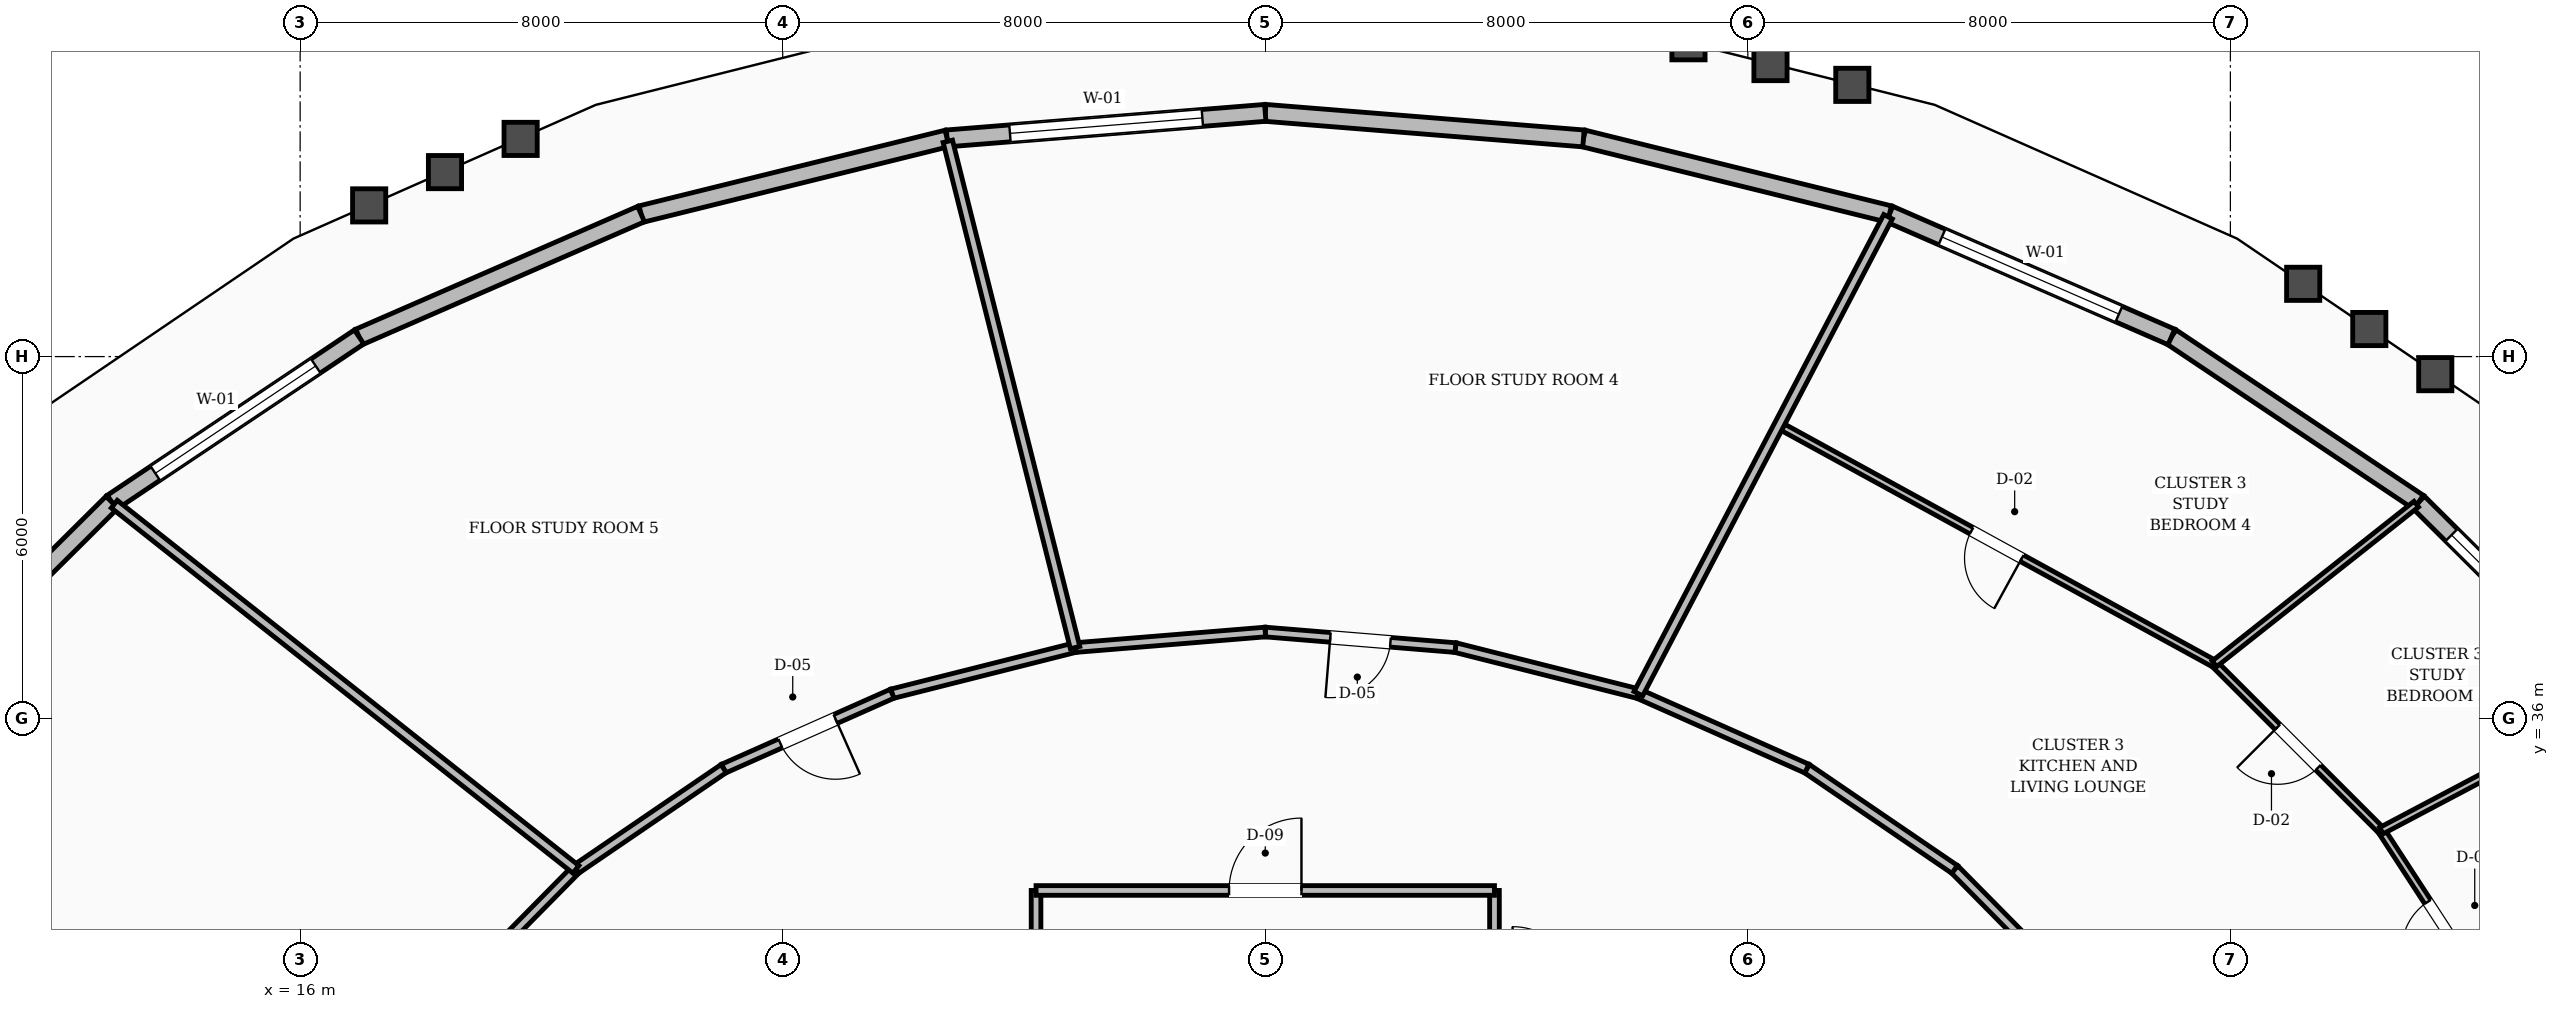
"""IFC4 building model, lengths in metres.
Left out: names, types, materials, properties, quantities, classifications, styles, units other than length and angle.
Written with IfcOpenShell. Run it as: python <this file> out.ifc"""

import sys

from ifc_helpers import new_model, si_unit, direction, frame, frame_2d, origin, place, context, subcontext, project, spatial, rectangle, extrude, element, fill, save


model = new_model("IFC4")
c1 = context("Model", 3, precision=1e-05, world=origin(), true_north=direction((0.0, 1.0)))
c2 = subcontext(c1, "Body", "Model", "MODEL_VIEW")
j1 = project(units=[si_unit("LENGTHUNIT", "METRE"), si_unit("PLANEANGLEUNIT", "RADIAN")], contexts=[c1])
p1 = place(None, origin())
s1 = spatial("IfcSite", under=j1, at=p1, CompositionType="ELEMENT")
p2 = place(p1, origin())
s2 = spatial("IfcBuilding", under=s1, at=p2, CompositionType="ELEMENT")
p3 = place(p2, frame((0.0, 0.0, 80.8)))
s3 = spatial("IfcBuildingStorey", under=s2, at=p3, CompositionType="ELEMENT", Elevation=80.8)
p4 = place(p3, frame((54.483, 36.245, 0.0), z_axis=(0.0, 0.0, 1.0), x_axis=(-0.709523691603, 0.704681581322, 0.0)))
e1 = element("IfcWall", 1, at=p4, inside=s3, PredefinedType="STANDARD", context=c2, shape_type="SweptSolid", body=[
    extrude(rectangle(XDim=4.74, YDim=0.28, at=frame_2d((2.37, 0.0))), origin(), (0.0, 0.0, 1.0), 2.71),
])
p5 = place(p4, frame((0.77, 0.0, 0.8)))
e2 = element("IfcOpeningElement", 2, at=p5, cuts=e1, PredefinedType="OPENING", context=c2, shape_type="SweptSolid", body=[
    extrude(rectangle(XDim=3.2, YDim=1.65, at=frame_2d((1.6, 0.825))), frame((0.0, 0.15, 0.0), z_axis=(0.0, -1.0, 0.0), x_axis=(1.0, 0.0, 0.0)), (0.0, 0.0, 1.0), 0.3),
])
p6 = place(p3, frame((51.12, 39.585, 0.0), z_axis=(0.0, 0.0, 1.0), x_axis=(-0.831173050052, 0.556013813558, 0.0)))
e3 = element("IfcWall", 3, at=p6, inside=s3, PredefinedType="STANDARD", context=c2, shape_type="SweptSolid", body=[
    extrude(rectangle(XDim=4.93, YDim=0.28, at=frame_2d((2.465, 0.0))), origin(), (0.0, 0.0, 1.0), 2.71),
])
p7 = place(p3, frame((47.023, 42.326, 0.0), z_axis=(0.0, 0.0, 1.0), x_axis=(-0.91677599057, 0.399401781561, 0.0)))
e4 = element("IfcWall", 4, at=p7, inside=s3, PredefinedType="STANDARD", context=c2, shape_type="SweptSolid", body=[
    extrude(rectangle(XDim=5.099, YDim=0.28, at=frame_2d((2.55, 0.0))), origin(), (0.0, 0.0, 1.0), 2.71),
])
p8 = place(p7, frame((0.95, 0.0, 0.8)))
e5 = element("IfcOpeningElement", 5, at=p8, cuts=e4, PredefinedType="OPENING", context=c2, shape_type="SweptSolid", body=[
    extrude(rectangle(XDim=3.2, YDim=1.65, at=frame_2d((1.6, 0.825))), frame((0.0, 0.15, 0.0), z_axis=(0.0, -1.0, 0.0), x_axis=(1.0, 0.0, 0.0)), (0.0, 0.0, 1.0), 0.3),
])
p9 = place(p3, frame((42.348, 44.362, 0.0), z_axis=(0.0, 0.0, 1.0), x_axis=(-0.970771314461, 0.240006364539, 0.0)))
e6 = element("IfcWall", 6, at=p9, inside=s3, PredefinedType="STANDARD", context=c2, shape_type="SweptSolid", body=[
    extrude(rectangle(XDim=5.226, YDim=0.28, at=frame_2d((2.613, 0.0))), origin(), (0.0, 0.0, 1.0), 2.71),
])
p10 = place(p3, frame((37.275, 45.616, 0.0), z_axis=(0.0, 0.0, 1.0), x_axis=(-0.996791618346, 0.080040424762, 0.0)))
e7 = element("IfcWall", 7, at=p10, inside=s3, PredefinedType="STANDARD", context=c2, shape_type="SweptSolid", body=[
    extrude(rectangle(XDim=5.292, YDim=0.28, at=frame_2d((2.646, 0.0))), origin(), (0.0, 0.0, 1.0), 2.71),
])
p11 = place(p3, frame((32.0, 46.04, 0.0), z_axis=(0.0, 0.0, 1.0), x_axis=(-0.996791618346, -0.080040424762, 0.0)))
e8 = element("IfcWall", 8, at=p11, inside=s3, PredefinedType="STANDARD", context=c2, shape_type="SweptSolid", body=[
    extrude(rectangle(XDim=5.292, YDim=0.28, at=frame_2d((2.646, 0.0))), origin(), (0.0, 0.0, 1.0), 2.71),
])
p12 = place(p11, frame((1.046, 0.0, 0.8)))
e9 = element("IfcOpeningElement", 9, at=p12, cuts=e8, PredefinedType="OPENING", context=c2, shape_type="SweptSolid", body=[
    extrude(rectangle(XDim=3.2, YDim=1.65, at=frame_2d((1.6, 0.825))), frame((0.0, 0.15, 0.0), z_axis=(0.0, -1.0, 0.0), x_axis=(1.0, 0.0, 0.0)), (0.0, 0.0, 1.0), 0.3),
])
p13 = place(p3, frame((26.725, 45.616, 0.0), z_axis=(0.0, 0.0, 1.0), x_axis=(-0.970771314461, -0.240006364539, 0.0)))
e10 = element("IfcWall", 10, at=p13, inside=s3, PredefinedType="STANDARD", context=c2, shape_type="SweptSolid", body=[
    extrude(rectangle(XDim=5.226, YDim=0.28, at=frame_2d((2.613, 0.0))), origin(), (0.0, 0.0, 1.0), 2.71),
])
p14 = place(p3, frame((21.652, 44.362, 0.0), z_axis=(0.0, 0.0, 1.0), x_axis=(-0.91677599057, -0.399401781561, 0.0)))
e11 = element("IfcWall", 11, at=p14, inside=s3, PredefinedType="STANDARD", context=c2, shape_type="SweptSolid", body=[
    extrude(rectangle(XDim=5.099, YDim=0.28, at=frame_2d((2.55, 0.0))), origin(), (0.0, 0.0, 1.0), 2.71),
])
p15 = place(p3, frame((16.977, 42.326, 0.0), z_axis=(0.0, 0.0, 1.0), x_axis=(-0.831173050052, -0.556013813558, 0.0)))
e12 = element("IfcWall", 12, at=p15, inside=s3, PredefinedType="STANDARD", context=c2, shape_type="SweptSolid", body=[
    extrude(rectangle(XDim=4.93, YDim=0.28, at=frame_2d((2.465, 0.0))), origin(), (0.0, 0.0, 1.0), 2.71),
])
p16 = place(p15, frame((0.865, 0.0, 0.8)))
e13 = element("IfcOpeningElement", 13, at=p16, cuts=e12, PredefinedType="OPENING", context=c2, shape_type="SweptSolid", body=[
    extrude(rectangle(XDim=3.2, YDim=1.65, at=frame_2d((1.6, 0.825))), frame((0.0, 0.15, 0.0), z_axis=(0.0, -1.0, 0.0), x_axis=(1.0, 0.0, 0.0)), (0.0, 0.0, 1.0), 0.3),
])
p17 = place(p3, frame((12.88, 39.585, 0.0), z_axis=(0.0, 0.0, 1.0), x_axis=(-0.709523691603, -0.704681581322, 0.0)))
e14 = element("IfcWall", 14, at=p17, inside=s3, PredefinedType="STANDARD", context=c2, shape_type="SweptSolid", body=[
    extrude(rectangle(XDim=4.74, YDim=0.28, at=frame_2d((2.37, 0.0))), origin(), (0.0, 0.0, 1.0), 2.71),
])
for number, where, z_axis, x_axis in (
    (15, (28.2, 31.45, 0.0), (0.0, 0.0, 1.0), (0.0, 1.0, 0.0)),
    (16, (35.8, 31.45, 0.0), (0.0, 0.0, 1.0), (0.0, 1.0, 0.0)),
):
    element("IfcWall", number, at=place(p3, frame(where, z_axis=z_axis, x_axis=x_axis)), inside=s3, PredefinedType="SOLIDWALL", context=c2, shape_type="SweptSolid", body=[
        extrude(rectangle(XDim=1.7, YDim=0.16, at=frame_2d((0.85, 0.0))), origin(), (0.0, 0.0, 1.0), 2.71),
    ])
p18 = place(p3, frame((28.2, 33.15, 0.0), z_axis=(0.0, 0.0, 1.0), x_axis=(1.0, 0.0, 0.0)))
e17 = element("IfcWall", 17, at=p18, inside=s3, PredefinedType="SOLIDWALL", context=c2, shape_type="SweptSolid", body=[
    extrude(rectangle(XDim=7.6, YDim=0.16, at=frame_2d((3.8, 0.0))), origin(), (0.0, 0.0, 1.0), 2.71),
])
p19 = place(p18, frame((3.2, 0.0, 0.0)))
e18 = element("IfcOpeningElement", 18, at=p19, cuts=e17, PredefinedType="OPENING", context=c2, shape_type="SweptSolid", body=[
    extrude(rectangle(XDim=1.2, YDim=2.1, at=frame_2d((0.6, 1.05))), frame((0.0, 0.09, 0.0), z_axis=(0.0, -1.0, 0.0), x_axis=(1.0, 0.0, 0.0)), (0.0, 0.0, 1.0), 0.18),
])
p20 = place(p3, frame((45.438, 31.463, 0.0), z_axis=(0.0, 0.0, 1.0), x_axis=(-0.702569520063, 0.711615113301, 0.0)))
e19 = element("IfcWall", 19, at=p20, inside=s3, PredefinedType="SOLIDWALL", context=c2, shape_type="SweptSolid", body=[
    extrude(rectangle(XDim=2.861, YDim=0.16, at=frame_2d((1.43, 0.0))), origin(), (0.0, 0.0, 1.0), 2.71),
])
p21 = place(p3, frame((43.428, 33.499, 0.0), z_axis=(0.0, 0.0, 1.0), x_axis=(-0.826112340767, 0.563505457323, 0.0)))
e20 = element("IfcWall", 20, at=p21, inside=s3, PredefinedType="SOLIDWALL", context=c2, shape_type="SweptSolid", body=[
    extrude(rectangle(XDim=2.965, YDim=0.16, at=frame_2d((1.482, 0.0))), origin(), (0.0, 0.0, 1.0), 2.71),
])
p22 = place(p3, frame((40.979, 35.17, 0.0), z_axis=(0.0, 0.0, 1.0), x_axis=(-0.913860932409, 0.406027334321, 0.0)))
e21 = element("IfcWall", 21, at=p22, inside=s3, PredefinedType="SOLIDWALL", context=c2, shape_type="SweptSolid", body=[
    extrude(rectangle(XDim=3.058, YDim=0.16, at=frame_2d((1.529, 0.0))), origin(), (0.0, 0.0, 1.0), 2.71),
])
p23 = place(p3, frame((38.185, 36.411, 0.0), z_axis=(0.0, 0.0, 1.0), x_axis=(-0.969653665365, 0.244482656326, 0.0)))
e22 = element("IfcWall", 22, at=p23, inside=s3, PredefinedType="SOLIDWALL", context=c2, shape_type="SweptSolid", body=[
    extrude(rectangle(XDim=3.127, YDim=0.16, at=frame_2d((1.563, 0.0))), origin(), (0.0, 0.0, 1.0), 2.71),
])
p24 = place(p3, frame((35.153, 37.176, 0.0), z_axis=(0.0, 0.0, 1.0), x_axis=(-0.996661331307, 0.081646743207, 0.0)))
e23 = element("IfcWall", 23, at=p24, inside=s3, PredefinedType="SOLIDWALL", context=c2, shape_type="SweptSolid", body=[
    extrude(rectangle(XDim=3.164, YDim=0.16, at=frame_2d((1.582, 0.0))), origin(), (0.0, 0.0, 1.0), 2.71),
])
p25 = place(p24, frame((1.082, 0.0, 0.0)))
e24 = element("IfcOpeningElement", 24, at=p25, cuts=e23, PredefinedType="OPENING", context=c2, shape_type="SweptSolid", body=[
    extrude(rectangle(XDim=1.0, YDim=2.1, at=frame_2d((0.5, 1.05))), frame((0.0, 0.09, 0.0), z_axis=(0.0, -1.0, 0.0), x_axis=(1.0, 0.0, 0.0)), (0.0, 0.0, 1.0), 0.18),
])
p26 = place(p3, frame((32.0, 37.434, 0.0), z_axis=(0.0, 0.0, 1.0), x_axis=(-0.996661331307, -0.081646743207, 0.0)))
e25 = element("IfcWall", 25, at=p26, inside=s3, PredefinedType="SOLIDWALL", context=c2, shape_type="SweptSolid", body=[
    extrude(rectangle(XDim=3.164, YDim=0.16, at=frame_2d((1.582, 0.0))), origin(), (0.0, 0.0, 1.0), 2.71),
])
p27 = place(p3, frame((28.847, 37.176, 0.0), z_axis=(0.0, 0.0, 1.0), x_axis=(-0.969653665365, -0.244482656326, 0.0)))
e26 = element("IfcWall", 26, at=p27, inside=s3, PredefinedType="SOLIDWALL", context=c2, shape_type="SweptSolid", body=[
    extrude(rectangle(XDim=3.127, YDim=0.16, at=frame_2d((1.563, 0.0))), origin(), (0.0, 0.0, 1.0), 2.71),
])
p28 = place(p3, frame((25.815, 36.411, 0.0), z_axis=(0.0, 0.0, 1.0), x_axis=(-0.913860932409, -0.406027334321, 0.0)))
e27 = element("IfcWall", 27, at=p28, inside=s3, PredefinedType="SOLIDWALL", context=c2, shape_type="SweptSolid", body=[
    extrude(rectangle(XDim=3.058, YDim=0.16, at=frame_2d((1.529, 0.0))), origin(), (0.0, 0.0, 1.0), 2.71),
])
p29 = place(p28, frame((1.029, 0.0, 0.0)))
e28 = element("IfcOpeningElement", 28, at=p29, cuts=e27, PredefinedType="OPENING", context=c2, shape_type="SweptSolid", body=[
    extrude(rectangle(XDim=1.0, YDim=2.1, at=frame_2d((0.5, 1.05))), frame((0.0, 0.09, 0.0), z_axis=(0.0, -1.0, 0.0), x_axis=(1.0, 0.0, 0.0)), (0.0, 0.0, 1.0), 0.18),
])
p30 = place(p3, frame((23.021, 35.17, 0.0), z_axis=(0.0, 0.0, 1.0), x_axis=(-0.826112340767, -0.563505457323, 0.0)))
e29 = element("IfcWall", 29, at=p30, inside=s3, PredefinedType="SOLIDWALL", context=c2, shape_type="SweptSolid", body=[
    extrude(rectangle(XDim=2.965, YDim=0.16, at=frame_2d((1.482, 0.0))), origin(), (0.0, 0.0, 1.0), 2.71),
])
p31 = place(p3, frame((20.572, 33.499, 0.0), z_axis=(0.0, 0.0, 1.0), x_axis=(-0.702569520063, -0.711615113301, 0.0)))
e30 = element("IfcWall", 30, at=p31, inside=s3, PredefinedType="SOLIDWALL", context=c2, shape_type="SweptSolid", body=[
    extrude(rectangle(XDim=2.861, YDim=0.16, at=frame_2d((1.43, 0.0))), origin(), (0.0, 0.0, 1.0), 2.71),
])
p32 = place(p3, frame((52.56, 30.985, 0.0), z_axis=(0.0, 0.0, 1.0), x_axis=(-0.545965266382, 0.83780781084, 0.0)))
e31 = element("IfcWall", 31, at=p32, inside=s3, PredefinedType="PARTITIONING", context=c2, shape_type="SweptSolid", body=[
    extrude(rectangle(XDim=3.767, YDim=0.12, at=frame_2d((1.884, 0.0))), origin(), (0.0, 0.0, 1.0), 2.71),
])
p33 = place(p32, frame((1.408, 0.0, 0.0)))
e32 = element("IfcOpeningElement", 32, at=p33, cuts=e31, PredefinedType="OPENING", context=c2, shape_type="SweptSolid", body=[
    extrude(rectangle(XDim=0.95, YDim=2.1, at=frame_2d((0.475, 1.05))), frame((0.0, 0.07, 0.0), z_axis=(0.0, -1.0, 0.0), x_axis=(1.0, 0.0, 0.0)), (0.0, 0.0, 1.0), 0.14),
])
p34 = place(p3, frame((50.503, 34.141, 0.0), z_axis=(0.0, 0.0, 1.0), x_axis=(-0.707293953749, 0.706919559066, 0.0)))
e33 = element("IfcWall", 33, at=p34, inside=s3, PredefinedType="PARTITIONING", context=c2, shape_type="SweptSolid", body=[
    extrude(rectangle(XDim=3.913, YDim=0.12, at=frame_2d((1.956, 0.0))), origin(), (0.0, 0.0, 1.0), 2.71),
])
p35 = place(p34, frame((1.481, 0.0, 0.0)))
e34 = element("IfcOpeningElement", 34, at=p35, cuts=e33, PredefinedType="OPENING", context=c2, shape_type="SweptSolid", body=[
    extrude(rectangle(XDim=0.95, YDim=2.1, at=frame_2d((0.475, 1.05))), frame((0.0, 0.07, 0.0), z_axis=(0.0, -1.0, 0.0), x_axis=(1.0, 0.0, 0.0)), (0.0, 0.0, 1.0), 0.14),
])
p36 = place(p3, frame((50.503, 34.141, 0.0), z_axis=(0.0, 0.0, 1.0), x_axis=(0.884085229331, 0.467325697216, 0.0)))
e35 = element("IfcWall", 35, at=p36, inside=s3, PredefinedType="PARTITIONING", context=c2, shape_type="SweptSolid", body=[
    extrude(rectangle(XDim=4.452, YDim=0.12, at=frame_2d((2.226, 0.0))), origin(), (0.0, 0.0, 1.0), 2.71),
])
p37 = place(p3, frame((47.736, 36.907, 0.0), z_axis=(0.0, 0.0, 1.0), x_axis=(-0.876923693875, 0.480629623641, 0.0)))
e36 = element("IfcWall", 36, at=p37, inside=s3, PredefinedType="PARTITIONING", context=c2, shape_type="SweptSolid", body=[
    extrude(rectangle(XDim=8.233, YDim=0.12, at=frame_2d((4.116, 0.0))), origin(), (0.0, 0.0, 1.0), 2.71),
])
p38 = place(p37, frame((3.642, 0.0, 0.0)))
e37 = element("IfcOpeningElement", 37, at=p38, cuts=e36, PredefinedType="OPENING", context=c2, shape_type="SweptSolid", body=[
    extrude(rectangle(XDim=0.95, YDim=2.1, at=frame_2d((0.475, 1.05))), frame((0.0, 0.07, 0.0), z_axis=(0.0, -1.0, 0.0), x_axis=(1.0, 0.0, 0.0)), (0.0, 0.0, 1.0), 0.14),
])
p39 = place(p3, frame((47.736, 36.907, 0.0), z_axis=(0.0, 0.0, 1.0), x_axis=(0.784224519378, 0.620477157683, 0.0)))
e38 = element("IfcWall", 38, at=p39, inside=s3, PredefinedType="PARTITIONING", context=c2, shape_type="SweptSolid", body=[
    extrude(rectangle(XDim=4.266, YDim=0.12, at=frame_2d((2.133, 0.0))), origin(), (0.0, 0.0, 1.0), 2.71),
])
p40 = place(p3, frame((38.185, 36.411, 0.0), z_axis=(0.0, 0.0, 1.0), x_axis=(0.463854687015, 0.885911298796, 0.0)))
e39 = element("IfcWall", 39, at=p40, inside=s3, PredefinedType="SOLIDWALL", context=c2, shape_type="SweptSolid", body=[
    extrude(rectangle(XDim=8.925, YDim=0.16, at=frame_2d((4.462, 0.0))), origin(), (0.0, 0.0, 1.0), 2.71),
])
p41 = place(p3, frame((28.847, 37.176, 0.0), z_axis=(0.0, 0.0, 1.0), x_axis=(-0.243816614966, 0.96982135379, 0.0)))
e40 = element("IfcWall", 40, at=p41, inside=s3, PredefinedType="SOLIDWALL", context=c2, shape_type="SweptSolid", body=[
    extrude(rectangle(XDim=8.654, YDim=0.16, at=frame_2d((4.327, 0.0))), origin(), (0.0, 0.0, 1.0), 2.71),
])
p42 = place(p3, frame((20.572, 33.499, 0.0), z_axis=(0.0, 0.0, 1.0), x_axis=(-0.784247697802, 0.62044786122, 0.0)))
e41 = element("IfcWall", 41, at=p42, inside=s3, PredefinedType="SOLIDWALL", context=c2, shape_type="SweptSolid", body=[
    extrude(rectangle(XDim=9.758, YDim=0.16, at=frame_2d((4.879, 0.0))), origin(), (0.0, 0.0, 1.0), 2.71),
])
p43 = place(p5, origin())
e42 = element("IfcWindow", 42, at=p43, inside=s3, PartitioningType="SINGLE_PANEL", PredefinedType="WINDOW", context=c2, shape_type="SweptSolid", body=[
    extrude(rectangle(XDim=3.2, YDim=1.65, at=frame_2d((1.6, 0.825))), frame((0.0, 0.03, 0.0), z_axis=(0.0, -1.0, 0.0), x_axis=(1.0, 0.0, 0.0)), (0.0, 0.0, 1.0), 0.06),
])
fill(e2, e42)
p44 = place(p8, origin())
e43 = element("IfcWindow", 43, at=p44, inside=s3, PartitioningType="SINGLE_PANEL", PredefinedType="WINDOW", context=c2, shape_type="SweptSolid", body=[
    extrude(rectangle(XDim=3.2, YDim=1.65, at=frame_2d((1.6, 0.825))), frame((0.0, 0.03, 0.0), z_axis=(0.0, -1.0, 0.0), x_axis=(1.0, 0.0, 0.0)), (0.0, 0.0, 1.0), 0.06),
])
fill(e5, e43)
p45 = place(p12, origin())
e44 = element("IfcWindow", 44, at=p45, inside=s3, PartitioningType="SINGLE_PANEL", PredefinedType="WINDOW", context=c2, shape_type="SweptSolid", body=[
    extrude(rectangle(XDim=3.2, YDim=1.65, at=frame_2d((1.6, 0.825))), frame((0.0, 0.03, 0.0), z_axis=(0.0, -1.0, 0.0), x_axis=(1.0, 0.0, 0.0)), (0.0, 0.0, 1.0), 0.06),
])
fill(e9, e44)
p46 = place(p16, origin())
e45 = element("IfcWindow", 45, at=p46, inside=s3, PartitioningType="SINGLE_PANEL", PredefinedType="WINDOW", context=c2, shape_type="SweptSolid", body=[
    extrude(rectangle(XDim=3.2, YDim=1.65, at=frame_2d((1.6, 0.825))), frame((0.0, 0.03, 0.0), z_axis=(0.0, -1.0, 0.0), x_axis=(1.0, 0.0, 0.0)), (0.0, 0.0, 1.0), 0.06),
])
fill(e13, e45)
p47 = place(p19, origin())
e46 = element("IfcDoor", 46, at=p47, inside=s3, OperationType="SINGLE_SWING_RIGHT", PredefinedType="DOOR", context=c2, shape_type="SweptSolid", body=[
    extrude(rectangle(XDim=1.2, YDim=2.1, at=frame_2d((0.6, 1.05))), frame((0.0, 0.025, 0.0), z_axis=(0.0, -1.0, 0.0), x_axis=(1.0, 0.0, 0.0)), (0.0, 0.0, 1.0), 0.05),
])
fill(e18, e46)
p48 = place(p33, origin())
e47 = element("IfcDoor", 47, at=p48, inside=s3, OperationType="SINGLE_SWING_LEFT", PredefinedType="DOOR", context=c2, shape_type="SweptSolid", body=[
    extrude(rectangle(XDim=0.95, YDim=2.1, at=frame_2d((0.475, 1.05))), frame((0.0, 0.025, 0.0), z_axis=(0.0, -1.0, 0.0), x_axis=(1.0, 0.0, 0.0)), (0.0, 0.0, 1.0), 0.05),
])
fill(e32, e47)
p49 = place(p35, origin())
e48 = element("IfcDoor", 48, at=p49, inside=s3, OperationType="SINGLE_SWING_RIGHT", PredefinedType="DOOR", context=c2, shape_type="SweptSolid", body=[
    extrude(rectangle(XDim=0.95, YDim=2.1, at=frame_2d((0.475, 1.05))), frame((0.0, 0.025, 0.0), z_axis=(0.0, -1.0, 0.0), x_axis=(1.0, 0.0, 0.0)), (0.0, 0.0, 1.0), 0.05),
])
fill(e34, e48)
p50 = place(p38, origin())
e49 = element("IfcDoor", 49, at=p50, inside=s3, OperationType="SINGLE_SWING_LEFT", PredefinedType="DOOR", context=c2, shape_type="SweptSolid", body=[
    extrude(rectangle(XDim=0.95, YDim=2.1, at=frame_2d((0.475, 1.05))), frame((0.0, 0.025, 0.0), z_axis=(0.0, -1.0, 0.0), x_axis=(1.0, 0.0, 0.0)), (0.0, 0.0, 1.0), 0.05),
])
fill(e37, e49)
p51 = place(p25, origin())
e50 = element("IfcDoor", 50, at=p51, inside=s3, OperationType="SINGLE_SWING_RIGHT", PredefinedType="DOOR", context=c2, shape_type="SweptSolid", body=[
    extrude(rectangle(XDim=1.0, YDim=2.1, at=frame_2d((0.5, 1.05))), frame((0.0, 0.025, 0.0), z_axis=(0.0, -1.0, 0.0), x_axis=(1.0, 0.0, 0.0)), (0.0, 0.0, 1.0), 0.05),
])
fill(e24, e50)
p52 = place(p29, origin())
e51 = element("IfcDoor", 51, at=p52, inside=s3, OperationType="SINGLE_SWING_LEFT", PredefinedType="DOOR", context=c2, shape_type="SweptSolid", body=[
    extrude(rectangle(XDim=1.0, YDim=2.1, at=frame_2d((0.5, 1.05))), frame((0.0, 0.025, 0.0), z_axis=(0.0, -1.0, 0.0), x_axis=(1.0, 0.0, 0.0)), (0.0, 0.0, 1.0), 0.05),
])
fill(e28, e51)
save(model, sys.argv[1])
